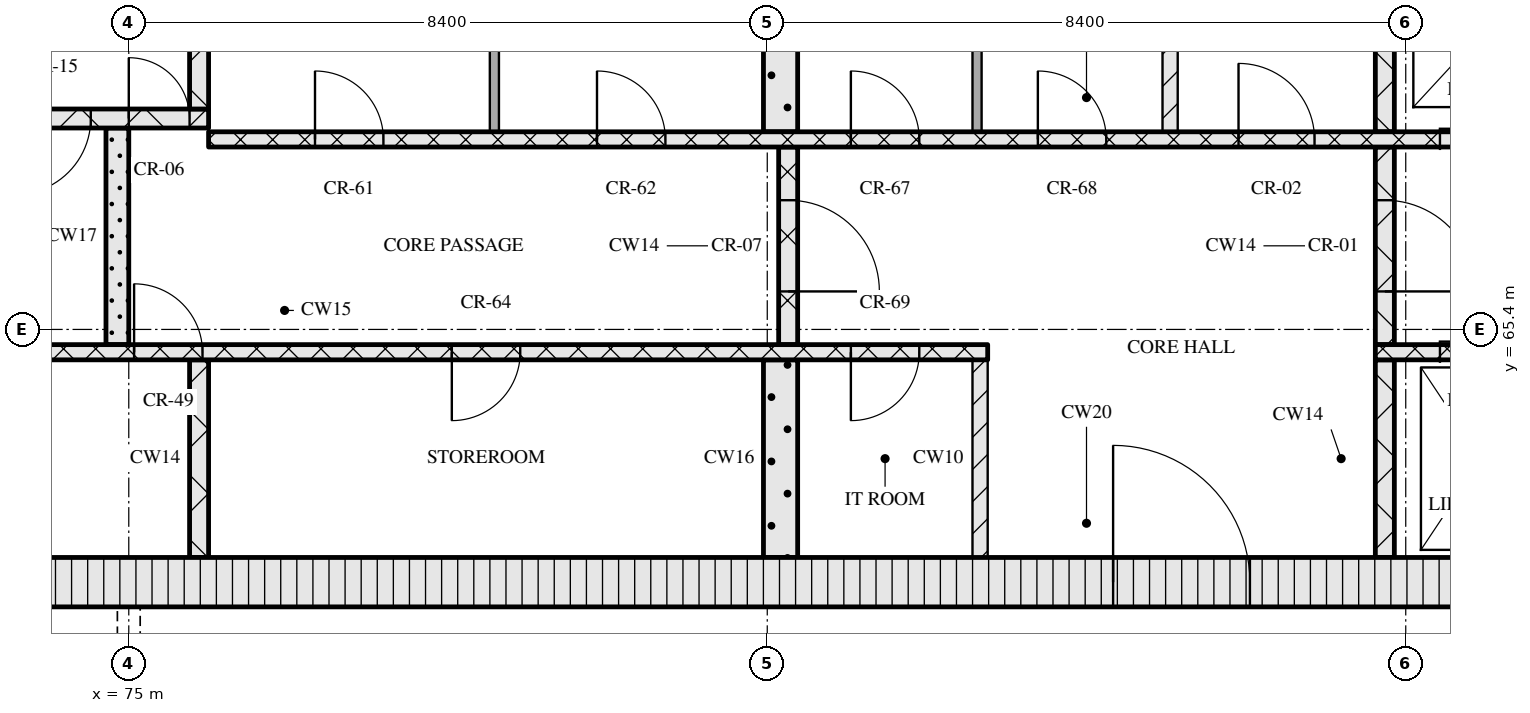
"""IFC4 building model, lengths in metres.
Left out: names, types, materials, properties, quantities, classifications, styles, units other than length and angle.
Written with IfcOpenShell. Run it as: python <this file> out.ifc"""

import sys

from ifc_helpers import new_model, si_unit, direction, frame, frame_2d, origin, place, context, subcontext, project, spatial, rectangle, extrude, element, fill, save


model = new_model("IFC4")
c1 = context("Model", 3, precision=1e-05, world=origin(), true_north=direction((0.0, 1.0)))
c2 = subcontext(c1, "Body", "Model", "MODEL_VIEW")
j1 = project(units=[si_unit("LENGTHUNIT", "METRE"), si_unit("PLANEANGLEUNIT", "RADIAN")], contexts=[c1])
p1 = place(None, origin())
s1 = spatial("IfcSite", under=j1, at=p1, CompositionType="ELEMENT")
p2 = place(p1, origin())
s2 = spatial("IfcBuilding", under=s1, at=p2, CompositionType="ELEMENT")
p3 = place(p2, frame((0.0, 0.0, 212.7)))
s3 = spatial("IfcBuildingStorey", under=s2, at=p3, CompositionType="ELEMENT", Elevation=212.7)
p4 = place(p3, frame((67.15, 62.075, 0.0), z_axis=(0.0, 0.0, 1.0), x_axis=(1.0, 0.0, 0.0)))
e1 = element("IfcWall", 1, at=p4, inside=s3, PredefinedType="SOLIDWALL", context=c2, shape_type="SweptSolid", body=[
    extrude(rectangle(XDim=40.9, YDim=0.65, at=frame_2d((20.45, 0.0))), origin(), (0.0, 0.0, 1.0), 3.32),
])
p5 = place(p4, frame((20.8, 0.0, 0.0)))
e2 = element("IfcOpeningElement", 2, at=p5, cuts=e1, PredefinedType="OPENING", context=c2, shape_type="SweptSolid", body=[
    extrude(rectangle(XDim=1.8, YDim=2.1, at=frame_2d((0.9, 1.05))), frame((0.0, 0.335, 0.0), z_axis=(0.0, -1.0, 0.0), x_axis=(1.0, 0.0, 0.0)), (0.0, 0.0, 1.0), 0.67),
])
p6 = place(p3, frame((75.925, 62.4, 0.0), z_axis=(0.0, 0.0, 1.0), x_axis=(0.0, 1.0, 0.0)))
e3 = element("IfcWall", 3, at=p6, inside=s3, PredefinedType="SOLIDWALL", context=c2, shape_type="SweptSolid", body=[
    extrude(rectangle(XDim=2.6, YDim=0.25, at=frame_2d((1.3, 0.0))), origin(), (0.0, 0.0, 1.0), 3.32),
])
p7 = place(p3, frame((83.575, 62.4, 0.0), z_axis=(0.0, 0.0, 1.0), x_axis=(0.0, 1.0, 0.0)))
e4 = element("IfcWall", 4, at=p7, inside=s3, PredefinedType="SOLIDWALL", context=c2, shape_type="SweptSolid", body=[
    extrude(rectangle(XDim=2.6, YDim=0.45, at=frame_2d((1.3, 0.0))), origin(), (0.0, 0.0, 1.0), 3.32),
])
p8 = place(p3, frame((86.2, 62.4, 0.0), z_axis=(0.0, 0.0, 1.0), x_axis=(0.0, 1.0, 0.0)))
e5 = element("IfcWall", 5, at=p8, inside=s3, PredefinedType="PARTITIONING", context=c2, shape_type="SweptSolid", body=[
    extrude(rectangle(XDim=2.6, YDim=0.2, at=frame_2d((1.3, 0.0))), origin(), (0.0, 0.0, 1.0), 3.32),
])
p9 = place(p3, frame((91.525, 62.4, 0.0), z_axis=(0.0, 0.0, 1.0), x_axis=(0.0, 1.0, 0.0)))
e6 = element("IfcWall", 6, at=p9, inside=s3, PredefinedType="SOLIDWALL", context=c2, shape_type="SweptSolid", body=[
    extrude(rectangle(XDim=2.6, YDim=0.25, at=frame_2d((1.3, 0.0))), origin(), (0.0, 0.0, 1.0), 3.32),
])
p10 = place(p3, frame((67.8, 65.1, 0.0), z_axis=(0.0, 0.0, 1.0), x_axis=(1.0, 0.0, 0.0)))
e7 = element("IfcWall", 7, at=p10, inside=s3, PredefinedType="SOLIDWALL", context=c2, shape_type="SweptSolid", body=[
    extrude(rectangle(XDim=18.5, YDim=0.2, at=frame_2d((9.25, 0.0))), origin(), (0.0, 0.0, 1.0), 3.32),
])
p11 = place(p10, frame((7.27, 0.0, 0.0)))
e8 = element("IfcOpeningElement", 8, at=p11, cuts=e7, PredefinedType="OPENING", context=c2, shape_type="SweptSolid", body=[
    extrude(rectangle(XDim=0.9, YDim=2.1, at=frame_2d((0.45, 1.05))), frame((0.0, 0.11, 0.0), z_axis=(0.0, -1.0, 0.0), x_axis=(1.0, 0.0, 0.0)), (0.0, 0.0, 1.0), 0.22),
])
p12 = place(p10, frame((11.45, 0.0, 0.0)))
e9 = element("IfcOpeningElement", 9, at=p12, cuts=e7, PredefinedType="OPENING", context=c2, shape_type="SweptSolid", body=[
    extrude(rectangle(XDim=0.9, YDim=2.1, at=frame_2d((0.45, 1.05))), frame((0.0, 0.11, 0.0), z_axis=(0.0, -1.0, 0.0), x_axis=(1.0, 0.0, 0.0)), (0.0, 0.0, 1.0), 0.22),
])
p13 = place(p10, frame((16.7, 0.0, 0.0)))
e10 = element("IfcOpeningElement", 10, at=p13, cuts=e7, PredefinedType="OPENING", context=c2, shape_type="SweptSolid", body=[
    extrude(rectangle(XDim=0.9, YDim=2.1, at=frame_2d((0.45, 1.05))), frame((0.0, 0.11, 0.0), z_axis=(0.0, -1.0, 0.0), x_axis=(1.0, 0.0, 0.0)), (0.0, 0.0, 1.0), 0.22),
])
p14 = place(p3, frame((91.4, 65.1, 0.0), z_axis=(0.0, 0.0, 1.0), x_axis=(1.0, 0.0, 0.0)))
e11 = element("IfcWall", 11, at=p14, inside=s3, PredefinedType="SOLIDWALL", context=c2, shape_type="SweptSolid", body=[
    extrude(rectangle(XDim=16.0, YDim=0.2, at=frame_2d((8.0, 0.0))), origin(), (0.0, 0.0, 1.0), 3.32),
])
p15 = place(p14, frame((0.85, 0.0, 0.0)))
e12 = element("IfcOpeningElement", 12, at=p15, cuts=e11, PredefinedType="OPENING", context=c2, shape_type="SweptSolid", body=[
    extrude(rectangle(XDim=1.1, YDim=2.1, at=frame_2d((0.55, 1.05))), frame((0.0, 0.11, 0.0), z_axis=(0.0, -1.0, 0.0), x_axis=(1.0, 0.0, 0.0)), (0.0, 0.0, 1.0), 0.22),
])
p16 = place(p14, frame((3.35, 0.0, 0.0)))
e13 = element("IfcOpeningElement", 13, at=p16, cuts=e11, PredefinedType="OPENING", context=c2, shape_type="SweptSolid", body=[
    extrude(rectangle(XDim=1.1, YDim=2.1, at=frame_2d((0.55, 1.05))), frame((0.0, 0.11, 0.0), z_axis=(0.0, -1.0, 0.0), x_axis=(1.0, 0.0, 0.0)), (0.0, 0.0, 1.0), 0.22),
])
p17 = place(p14, frame((5.85, 0.0, 0.0)))
e14 = element("IfcOpeningElement", 14, at=p17, cuts=e11, PredefinedType="OPENING", context=c2, shape_type="SweptSolid", body=[
    extrude(rectangle(XDim=1.1, YDim=2.1, at=frame_2d((0.55, 1.05))), frame((0.0, 0.11, 0.0), z_axis=(0.0, -1.0, 0.0), x_axis=(1.0, 0.0, 0.0)), (0.0, 0.0, 1.0), 0.22),
])
p18 = place(p14, frame((7.83, 0.0, 0.0)))
e15 = element("IfcOpeningElement", 15, at=p18, cuts=e11, PredefinedType="OPENING", context=c2, shape_type="SweptSolid", body=[
    extrude(rectangle(XDim=0.9, YDim=2.1, at=frame_2d((0.45, 1.05))), frame((0.0, 0.11, 0.0), z_axis=(0.0, -1.0, 0.0), x_axis=(1.0, 0.0, 0.0)), (0.0, 0.0, 1.0), 0.22),
])
p19 = place(p3, frame((74.85, 65.2, 0.0), z_axis=(0.0, 0.0, 1.0), x_axis=(0.0, 1.0, 0.0)))
e16 = element("IfcWall", 16, at=p19, inside=s3, PredefinedType="SOLIDWALL", context=c2, shape_type="SweptSolid", body=[
    extrude(rectangle(XDim=2.85, YDim=0.3, at=frame_2d((1.425, 0.0))), origin(), (0.0, 0.0, 1.0), 3.32),
])
p20 = place(p3, frame((83.675, 65.2, 0.0), z_axis=(0.0, 0.0, 1.0), x_axis=(0.0, 1.0, 0.0)))
e17 = element("IfcWall", 17, at=p20, inside=s3, PredefinedType="SOLIDWALL", context=c2, shape_type="SweptSolid", body=[
    extrude(rectangle(XDim=2.6, YDim=0.25, at=frame_2d((1.3, 0.0))), origin(), (0.0, 0.0, 1.0), 3.32),
])
p21 = place(p20, frame((0.7, 0.0, 0.0)))
e18 = element("IfcOpeningElement", 18, at=p21, cuts=e17, PredefinedType="OPENING", context=c2, shape_type="SweptSolid", body=[
    extrude(rectangle(XDim=1.2, YDim=2.1, at=frame_2d((0.6, 1.05))), frame((0.0, 0.135, 0.0), z_axis=(0.0, -1.0, 0.0), x_axis=(1.0, 0.0, 0.0)), (0.0, 0.0, 1.0), 0.27),
])
p22 = place(p3, frame((91.525, 65.2, 0.0), z_axis=(0.0, 0.0, 1.0), x_axis=(0.0, 1.0, 0.0)))
e19 = element("IfcWall", 19, at=p22, inside=s3, PredefinedType="SOLIDWALL", context=c2, shape_type="SweptSolid", body=[
    extrude(rectangle(XDim=2.6, YDim=0.25, at=frame_2d((1.3, 0.0))), origin(), (0.0, 0.0, 1.0), 3.32),
])
p23 = place(p22, frame((0.7, 0.0, 0.0)))
e20 = element("IfcOpeningElement", 20, at=p23, cuts=e19, PredefinedType="OPENING", context=c2, shape_type="SweptSolid", body=[
    extrude(rectangle(XDim=1.2, YDim=2.1, at=frame_2d((0.6, 1.05))), frame((0.0, 0.135, 0.0), z_axis=(0.0, -1.0, 0.0), x_axis=(1.0, 0.0, 0.0)), (0.0, 0.0, 1.0), 0.27),
])
p24 = place(p3, frame((76.05, 67.9, 0.0), z_axis=(0.0, 0.0, 1.0), x_axis=(1.0, 0.0, 0.0)))
e21 = element("IfcWall", 21, at=p24, inside=s3, PredefinedType="SOLIDWALL", context=c2, shape_type="SweptSolid", body=[
    extrude(rectangle(XDim=23.1, YDim=0.2, at=frame_2d((11.55, 0.0))), origin(), (0.0, 0.0, 1.0), 3.32),
])
p25 = place(p24, frame((1.4, 0.0, 0.0)))
e22 = element("IfcOpeningElement", 22, at=p25, cuts=e21, PredefinedType="OPENING", context=c2, shape_type="SweptSolid", body=[
    extrude(rectangle(XDim=0.9, YDim=2.1, at=frame_2d((0.45, 1.05))), frame((0.0, 0.11, 0.0), z_axis=(0.0, -1.0, 0.0), x_axis=(1.0, 0.0, 0.0)), (0.0, 0.0, 1.0), 0.22),
])
p26 = place(p24, frame((5.11, 0.0, 0.0)))
e23 = element("IfcOpeningElement", 23, at=p26, cuts=e21, PredefinedType="OPENING", context=c2, shape_type="SweptSolid", body=[
    extrude(rectangle(XDim=0.9, YDim=2.1, at=frame_2d((0.45, 1.05))), frame((0.0, 0.11, 0.0), z_axis=(0.0, -1.0, 0.0), x_axis=(1.0, 0.0, 0.0)), (0.0, 0.0, 1.0), 0.22),
])
p27 = place(p24, frame((8.45, 0.0, 0.0)))
e24 = element("IfcOpeningElement", 24, at=p27, cuts=e21, PredefinedType="OPENING", context=c2, shape_type="SweptSolid", body=[
    extrude(rectangle(XDim=0.9, YDim=2.1, at=frame_2d((0.45, 1.05))), frame((0.0, 0.11, 0.0), z_axis=(0.0, -1.0, 0.0), x_axis=(1.0, 0.0, 0.0)), (0.0, 0.0, 1.0), 0.22),
])
p28 = place(p24, frame((10.91, 0.0, 0.0)))
e25 = element("IfcOpeningElement", 25, at=p28, cuts=e21, PredefinedType="OPENING", context=c2, shape_type="SweptSolid", body=[
    extrude(rectangle(XDim=0.9, YDim=2.1, at=frame_2d((0.45, 1.05))), frame((0.0, 0.11, 0.0), z_axis=(0.0, -1.0, 0.0), x_axis=(1.0, 0.0, 0.0)), (0.0, 0.0, 1.0), 0.22),
])
p29 = place(p24, frame((13.55, 0.0, 0.0)))
e26 = element("IfcOpeningElement", 26, at=p29, cuts=e21, PredefinedType="OPENING", context=c2, shape_type="SweptSolid", body=[
    extrude(rectangle(XDim=1.0, YDim=2.1, at=frame_2d((0.5, 1.05))), frame((0.0, 0.11, 0.0), z_axis=(0.0, -1.0, 0.0), x_axis=(1.0, 0.0, 0.0)), (0.0, 0.0, 1.0), 0.22),
])
p30 = place(p24, frame((16.2, 0.0, 0.0)))
e27 = element("IfcOpeningElement", 27, at=p30, cuts=e21, PredefinedType="OPENING", context=c2, shape_type="SweptSolid", body=[
    extrude(rectangle(XDim=1.1, YDim=2.1, at=frame_2d((0.55, 1.05))), frame((0.0, 0.11, 0.0), z_axis=(0.0, -1.0, 0.0), x_axis=(1.0, 0.0, 0.0)), (0.0, 0.0, 1.0), 0.22),
])
p31 = place(p24, frame((18.7, 0.0, 0.0)))
e28 = element("IfcOpeningElement", 28, at=p31, cuts=e21, PredefinedType="OPENING", context=c2, shape_type="SweptSolid", body=[
    extrude(rectangle(XDim=1.1, YDim=2.1, at=frame_2d((0.55, 1.05))), frame((0.0, 0.11, 0.0), z_axis=(0.0, -1.0, 0.0), x_axis=(1.0, 0.0, 0.0)), (0.0, 0.0, 1.0), 0.22),
])
p32 = place(p24, frame((21.2, 0.0, 0.0)))
e29 = element("IfcOpeningElement", 29, at=p32, cuts=e21, PredefinedType="OPENING", context=c2, shape_type="SweptSolid", body=[
    extrude(rectangle(XDim=1.1, YDim=2.1, at=frame_2d((0.55, 1.05))), frame((0.0, 0.11, 0.0), z_axis=(0.0, -1.0, 0.0), x_axis=(1.0, 0.0, 0.0)), (0.0, 0.0, 1.0), 0.22),
])
p33 = place(p3, frame((79.81, 68.0, 0.0), z_axis=(0.0, 0.0, 1.0), x_axis=(0.0, 1.0, 0.0)))
e30 = element("IfcWall", 30, at=p33, inside=s3, PredefinedType="PARTITIONING", context=c2, shape_type="SweptSolid", body=[
    extrude(rectangle(XDim=2.6, YDim=0.12, at=frame_2d((1.3, 0.0))), origin(), (0.0, 0.0, 1.0), 3.32),
])
p34 = place(p3, frame((83.575, 68.0, 0.0), z_axis=(0.0, 0.0, 1.0), x_axis=(0.0, 1.0, 0.0)))
e31 = element("IfcWall", 31, at=p34, inside=s3, PredefinedType="SOLIDWALL", context=c2, shape_type="SweptSolid", body=[
    extrude(rectangle(XDim=2.6, YDim=0.45, at=frame_2d((1.3, 0.0))), origin(), (0.0, 0.0, 1.0), 3.32),
])
p35 = place(p3, frame((86.16, 68.0, 0.0), z_axis=(0.0, 0.0, 1.0), x_axis=(0.0, 1.0, 0.0)))
e32 = element("IfcWall", 32, at=p35, inside=s3, PredefinedType="PARTITIONING", context=c2, shape_type="SweptSolid", body=[
    extrude(rectangle(XDim=2.6, YDim=0.12, at=frame_2d((1.3, 0.0))), origin(), (0.0, 0.0, 1.0), 3.32),
])
p36 = place(p3, frame((88.7, 68.0, 0.0), z_axis=(0.0, 0.0, 1.0), x_axis=(0.0, 1.0, 0.0)))
e33 = element("IfcWall", 33, at=p36, inside=s3, PredefinedType="PARTITIONING", context=c2, shape_type="SweptSolid", body=[
    extrude(rectangle(XDim=2.6, YDim=0.2, at=frame_2d((1.3, 0.0))), origin(), (0.0, 0.0, 1.0), 3.32),
])
p37 = place(p3, frame((91.525, 68.0, 0.0), z_axis=(0.0, 0.0, 1.0), x_axis=(0.0, 1.0, 0.0)))
e34 = element("IfcWall", 34, at=p37, inside=s3, PredefinedType="SOLIDWALL", context=c2, shape_type="SweptSolid", body=[
    extrude(rectangle(XDim=2.6, YDim=0.25, at=frame_2d((1.3, 0.0))), origin(), (0.0, 0.0, 1.0), 3.32),
])
p38 = place(p3, frame((67.8, 68.175, 0.0), z_axis=(0.0, 0.0, 1.0), x_axis=(1.0, 0.0, 0.0)))
e35 = element("IfcWall", 35, at=p38, inside=s3, PredefinedType="SOLIDWALL", context=c2, shape_type="SweptSolid", body=[
    extrude(rectangle(XDim=8.25, YDim=0.25, at=frame_2d((4.125, 0.0))), origin(), (0.0, 0.0, 1.0), 3.32),
])
p39 = place(p38, frame((5.7, 0.0, 0.0)))
e36 = element("IfcOpeningElement", 36, at=p39, cuts=e35, PredefinedType="OPENING", context=c2, shape_type="SweptSolid", body=[
    extrude(rectangle(XDim=1.0, YDim=2.1, at=frame_2d((0.5, 1.05))), frame((0.0, 0.135, 0.0), z_axis=(0.0, -1.0, 0.0), x_axis=(1.0, 0.0, 0.0)), (0.0, 0.0, 1.0), 0.27),
])
p40 = place(p38, frame((7.2, 0.0, 0.0)))
e37 = element("IfcOpeningElement", 37, at=p40, cuts=e35, PredefinedType="OPENING", context=c2, shape_type="SweptSolid", body=[
    extrude(rectangle(XDim=0.8, YDim=2.1, at=frame_2d((0.4, 1.05))), frame((0.0, 0.135, 0.0), z_axis=(0.0, -1.0, 0.0), x_axis=(1.0, 0.0, 0.0)), (0.0, 0.0, 1.0), 0.27),
])
p41 = place(p3, frame((75.925, 68.3, 0.0), z_axis=(0.0, 0.0, 1.0), x_axis=(0.0, 1.0, 0.0)))
e38 = element("IfcWall", 38, at=p41, inside=s3, PredefinedType="SOLIDWALL", context=c2, shape_type="SweptSolid", body=[
    extrude(rectangle(XDim=2.3, YDim=0.25, at=frame_2d((1.15, 0.0))), origin(), (0.0, 0.0, 1.0), 3.32),
])
p42 = place(p5, origin())
e39 = element("IfcDoor", 39, at=p42, inside=s3, OperationType="DOUBLE_DOOR_SINGLE_SWING", PredefinedType="DOOR", context=c2, shape_type="SweptSolid", body=[
    extrude(rectangle(XDim=1.8, YDim=2.1, at=frame_2d((0.9, 1.05))), frame((0.0, 0.025, 0.0), z_axis=(0.0, -1.0, 0.0), x_axis=(1.0, 0.0, 0.0)), (0.0, 0.0, 1.0), 0.05),
])
fill(e2, e39)
p43 = place(p11, origin())
e40 = element("IfcDoor", 40, at=p43, inside=s3, OperationType="SINGLE_SWING_LEFT", PredefinedType="DOOR", context=c2, shape_type="SweptSolid", body=[
    extrude(rectangle(XDim=0.9, YDim=2.1, at=frame_2d((0.45, 1.05))), frame((0.0, 0.025, 0.0), z_axis=(0.0, -1.0, 0.0), x_axis=(1.0, 0.0, 0.0)), (0.0, 0.0, 1.0), 0.05),
])
fill(e8, e40)
p44 = place(p12, origin())
e41 = element("IfcDoor", 41, at=p44, inside=s3, OperationType="SINGLE_SWING_RIGHT", PredefinedType="DOOR", context=c2, shape_type="SweptSolid", body=[
    extrude(rectangle(XDim=0.9, YDim=2.1, at=frame_2d((0.45, 1.05))), frame((0.0, 0.025, 0.0), z_axis=(0.0, -1.0, 0.0), x_axis=(1.0, 0.0, 0.0)), (0.0, 0.0, 1.0), 0.05),
])
fill(e9, e41)
p45 = place(p13, origin())
e42 = element("IfcDoor", 42, at=p45, inside=s3, OperationType="SINGLE_SWING_RIGHT", PredefinedType="DOOR", context=c2, shape_type="SweptSolid", body=[
    extrude(rectangle(XDim=0.9, YDim=2.1, at=frame_2d((0.45, 1.05))), frame((0.0, 0.025, 0.0), z_axis=(0.0, -1.0, 0.0), x_axis=(1.0, 0.0, 0.0)), (0.0, 0.0, 1.0), 0.05),
])
fill(e10, e42)
p46 = place(p15, origin())
e43 = element("IfcDoor", 43, at=p46, inside=s3, OperationType="SLIDING_TO_LEFT", PredefinedType="DOOR", context=c2, shape_type="SweptSolid", body=[
    extrude(rectangle(XDim=1.1, YDim=2.1, at=frame_2d((0.55, 1.05))), frame((0.0, 0.025, 0.0), z_axis=(0.0, -1.0, 0.0), x_axis=(1.0, 0.0, 0.0)), (0.0, 0.0, 1.0), 0.05),
])
fill(e12, e43)
p47 = place(p21, origin())
e44 = element("IfcDoor", 44, at=p47, inside=s3, OperationType="SINGLE_SWING_RIGHT", PredefinedType="DOOR", context=c2, shape_type="SweptSolid", body=[
    extrude(rectangle(XDim=1.2, YDim=2.1, at=frame_2d((0.6, 1.05))), frame((0.0, 0.025, 0.0), z_axis=(0.0, -1.0, 0.0), x_axis=(1.0, 0.0, 0.0)), (0.0, 0.0, 1.0), 0.05),
])
fill(e18, e44)
p48 = place(p23, origin())
e45 = element("IfcDoor", 45, at=p48, inside=s3, OperationType="SINGLE_SWING_RIGHT", PredefinedType="DOOR", context=c2, shape_type="SweptSolid", body=[
    extrude(rectangle(XDim=1.2, YDim=2.1, at=frame_2d((0.6, 1.05))), frame((0.0, 0.025, 0.0), z_axis=(0.0, -1.0, 0.0), x_axis=(1.0, 0.0, 0.0)), (0.0, 0.0, 1.0), 0.05),
])
fill(e20, e45)
p49 = place(p25, origin())
e46 = element("IfcDoor", 46, at=p49, inside=s3, OperationType="SINGLE_SWING_LEFT", PredefinedType="DOOR", context=c2, shape_type="SweptSolid", body=[
    extrude(rectangle(XDim=0.9, YDim=2.1, at=frame_2d((0.45, 1.05))), frame((0.0, 0.025, 0.0), z_axis=(0.0, -1.0, 0.0), x_axis=(1.0, 0.0, 0.0)), (0.0, 0.0, 1.0), 0.05),
])
fill(e22, e46)
p50 = place(p26, origin())
e47 = element("IfcDoor", 47, at=p50, inside=s3, OperationType="SINGLE_SWING_LEFT", PredefinedType="DOOR", context=c2, shape_type="SweptSolid", body=[
    extrude(rectangle(XDim=0.9, YDim=2.1, at=frame_2d((0.45, 1.05))), frame((0.0, 0.025, 0.0), z_axis=(0.0, -1.0, 0.0), x_axis=(1.0, 0.0, 0.0)), (0.0, 0.0, 1.0), 0.05),
])
fill(e23, e47)
p51 = place(p27, origin())
e48 = element("IfcDoor", 48, at=p51, inside=s3, OperationType="SINGLE_SWING_LEFT", PredefinedType="DOOR", context=c2, shape_type="SweptSolid", body=[
    extrude(rectangle(XDim=0.9, YDim=2.1, at=frame_2d((0.45, 1.05))), frame((0.0, 0.025, 0.0), z_axis=(0.0, -1.0, 0.0), x_axis=(1.0, 0.0, 0.0)), (0.0, 0.0, 1.0), 0.05),
])
fill(e24, e48)
p52 = place(p28, origin())
e49 = element("IfcDoor", 49, at=p52, inside=s3, OperationType="SINGLE_SWING_LEFT", PredefinedType="DOOR", context=c2, shape_type="SweptSolid", body=[
    extrude(rectangle(XDim=0.9, YDim=2.1, at=frame_2d((0.45, 1.05))), frame((0.0, 0.025, 0.0), z_axis=(0.0, -1.0, 0.0), x_axis=(1.0, 0.0, 0.0)), (0.0, 0.0, 1.0), 0.05),
])
fill(e25, e49)
p53 = place(p29, origin())
e50 = element("IfcDoor", 50, at=p53, inside=s3, OperationType="SINGLE_SWING_LEFT", PredefinedType="DOOR", context=c2, shape_type="SweptSolid", body=[
    extrude(rectangle(XDim=1.0, YDim=2.1, at=frame_2d((0.5, 1.05))), frame((0.0, 0.025, 0.0), z_axis=(0.0, -1.0, 0.0), x_axis=(1.0, 0.0, 0.0)), (0.0, 0.0, 1.0), 0.05),
])
fill(e26, e50)
p54 = place(p30, origin())
e51 = element("IfcDoor", 51, at=p54, inside=s3, OperationType="SLIDING_TO_RIGHT", PredefinedType="DOOR", context=c2, shape_type="SweptSolid", body=[
    extrude(rectangle(XDim=1.1, YDim=2.1, at=frame_2d((0.55, 1.05))), frame((0.0, 0.025, 0.0), z_axis=(0.0, -1.0, 0.0), x_axis=(1.0, 0.0, 0.0)), (0.0, 0.0, 1.0), 0.05),
])
fill(e27, e51)
p55 = place(p39, origin())
e52 = element("IfcDoor", 52, at=p55, inside=s3, OperationType="SINGLE_SWING_RIGHT", PredefinedType="DOOR", context=c2, shape_type="SweptSolid", body=[
    extrude(rectangle(XDim=1.0, YDim=2.1, at=frame_2d((0.5, 1.05))), frame((0.0, 0.025, 0.0), z_axis=(0.0, -1.0, 0.0), x_axis=(1.0, 0.0, 0.0)), (0.0, 0.0, 1.0), 0.05),
])
fill(e36, e52)
p56 = place(p40, origin())
e53 = element("IfcDoor", 53, at=p56, inside=s3, OperationType="SINGLE_SWING_LEFT", PredefinedType="DOOR", context=c2, shape_type="SweptSolid", body=[
    extrude(rectangle(XDim=0.8, YDim=2.1, at=frame_2d((0.4, 1.05))), frame((0.0, 0.025, 0.0), z_axis=(0.0, -1.0, 0.0), x_axis=(1.0, 0.0, 0.0)), (0.0, 0.0, 1.0), 0.05),
])
fill(e37, e53)
save(model, sys.argv[1])
